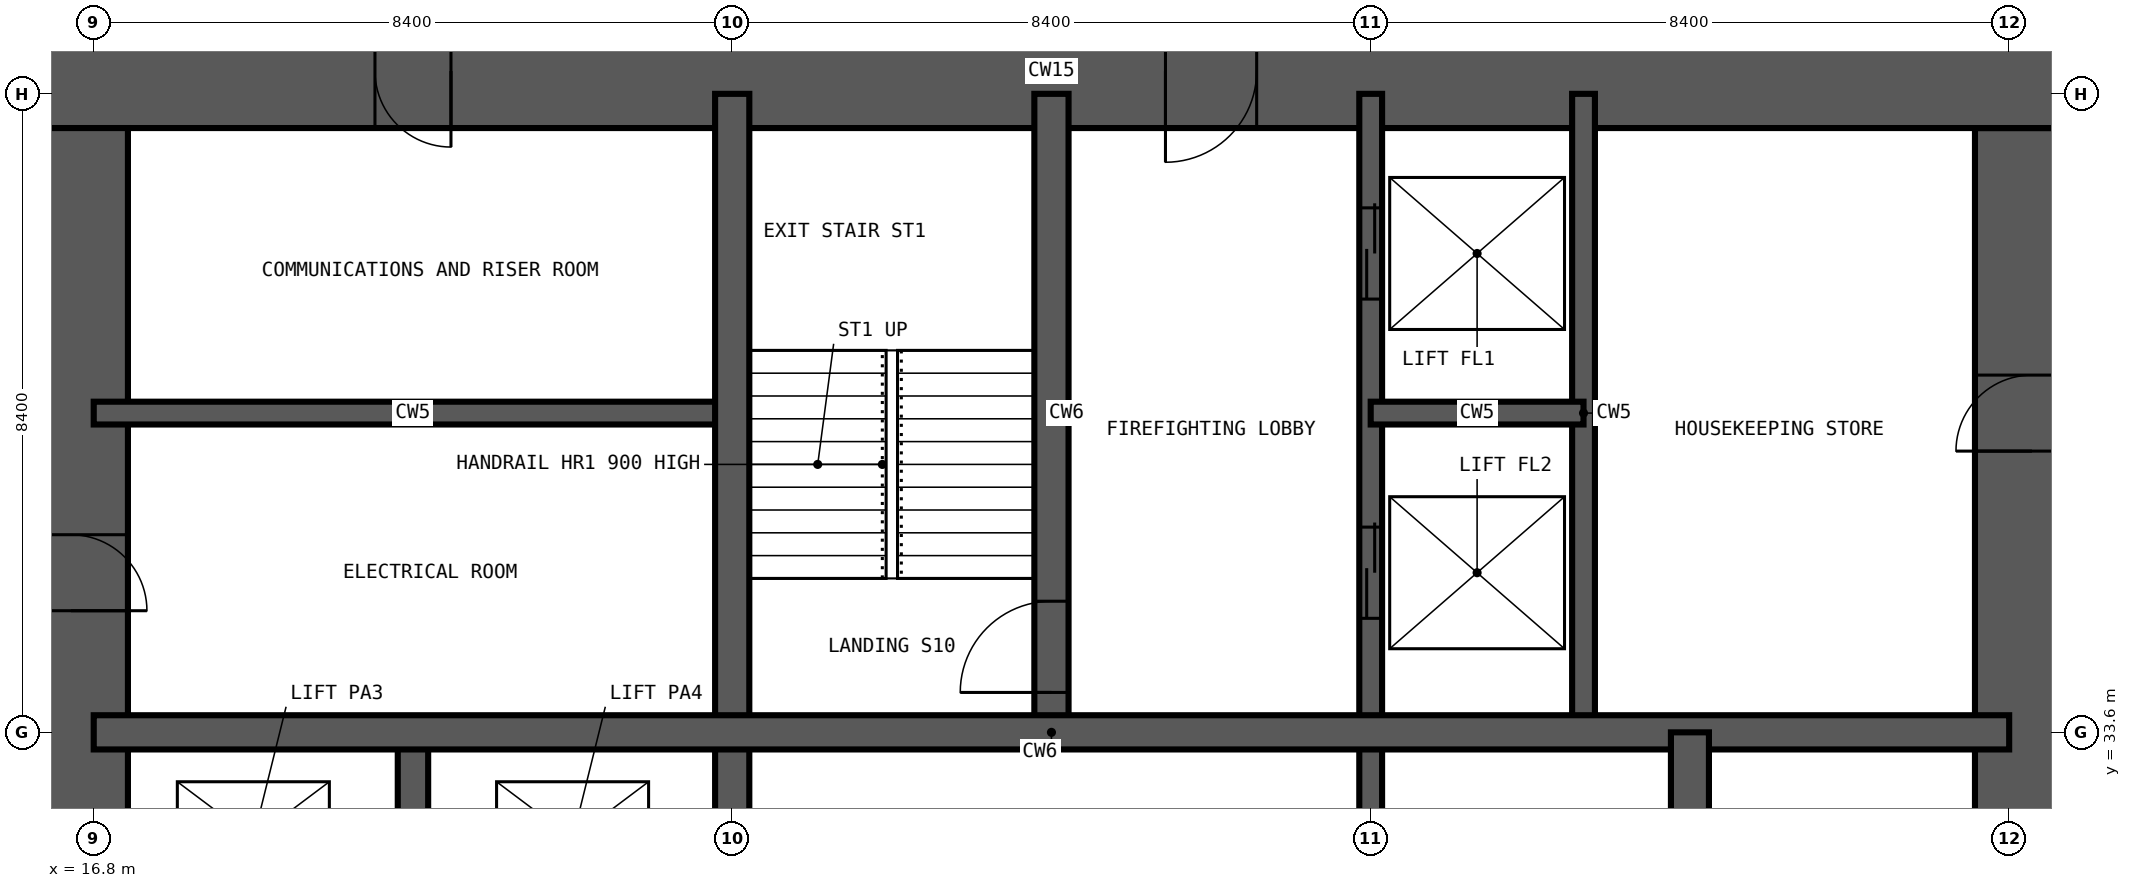
"""IFC4 building model, lengths in metres.
Left out: names, types, materials, properties, quantities, classifications, styles, units other than length and angle.
Written with IfcOpenShell. Run it as: python <this file> out.ifc"""

import sys

from ifc_helpers import new_model, si_unit, direction, frame, frame_2d, origin, place, context, subcontext, project, spatial, rectangle, extrude, element, fill, save


model = new_model("IFC4")
c1 = context("Model", 3, precision=1e-05, world=origin(), true_north=direction((0.0, 1.0)))
c2 = subcontext(c1, "Body", "Model", "MODEL_VIEW")
j1 = project(units=[si_unit("LENGTHUNIT", "METRE"), si_unit("PLANEANGLEUNIT", "RADIAN")], contexts=[c1])
p1 = place(None, origin())
s1 = spatial("IfcSite", under=j1, at=p1, CompositionType="ELEMENT")
p2 = place(p1, origin())
s2 = spatial("IfcBuilding", under=s1, at=p2, CompositionType="ELEMENT")
p3 = place(p2, frame((0.0, 0.0, 52.2)))
s3 = spatial("IfcBuildingStorey", under=s2, at=p3, CompositionType="ELEMENT", Elevation=52.2)
p4 = place(p3, frame((42.3, 17.25, -0.35), z_axis=(0.0, 0.0, 1.0), x_axis=(0.0, 1.0, 0.0)))
e1 = element("IfcWall", 1, at=p4, inside=s3, PredefinedType="SHEAR", context=c2, shape_type="SweptSolid", body=[
    extrude(rectangle(XDim=24.3, YDim=1.5, at=frame_2d((12.15, 0.0))), origin(), (0.0, 0.0, 1.0), 3.6),
])
p5 = place(p4, frame((0.35, 0.0, 0.35)))
e2 = element("IfcOpeningElement", 2, at=p5, cuts=e1, PredefinedType="OPENING", context=c2, shape_type="SweptSolid", body=[
    extrude(rectangle(XDim=1.2, YDim=2.2, at=frame_2d((0.6, 1.1))), frame((0.0, 0.76, 0.0), z_axis=(0.0, -1.0, 0.0), x_axis=(1.0, 0.0, 0.0)), (0.0, 0.0, 1.0), 1.52),
])
p6 = place(p4, frame((11.65, 0.0, 0.35)))
e3 = element("IfcOpeningElement", 3, at=p6, cuts=e1, PredefinedType="OPENING", context=c2, shape_type="SweptSolid", body=[
    extrude(rectangle(XDim=1.0, YDim=2.1, at=frame_2d((0.5, 1.05))), frame((0.0, 0.76, 0.0), z_axis=(0.0, -1.0, 0.0), x_axis=(1.0, 0.0, 0.0)), (0.0, 0.0, 1.0), 1.52),
])
p7 = place(p4, frame((20.05, 0.0, 0.35)))
e4 = element("IfcOpeningElement", 4, at=p7, cuts=e1, PredefinedType="OPENING", context=c2, shape_type="SweptSolid", body=[
    extrude(rectangle(XDim=1.0, YDim=2.1, at=frame_2d((0.5, 1.05))), frame((0.0, 0.76, 0.0), z_axis=(0.0, -1.0, 0.0), x_axis=(1.0, 0.0, 0.0)), (0.0, 0.0, 1.0), 1.52),
])
p8 = place(p3, frame((43.05, 42.3, -0.35), z_axis=(0.0, 0.0, 1.0), x_axis=(-1.0, 0.0, 0.0)))
e5 = element("IfcWall", 5, at=p8, inside=s3, PredefinedType="SHEAR", context=c2, shape_type="SweptSolid", body=[
    extrude(rectangle(XDim=27.3, YDim=1.5, at=frame_2d((13.65, 0.0))), origin(), (0.0, 0.0, 1.0), 3.6),
])
p9 = place(p8, frame((21.55, 0.0, 0.35)))
e6 = element("IfcOpeningElement", 6, at=p9, cuts=e5, PredefinedType="OPENING", context=c2, shape_type="SweptSolid", body=[
    extrude(rectangle(XDim=1.0, YDim=2.1, at=frame_2d((0.5, 1.05))), frame((0.0, 0.76, 0.0), z_axis=(0.0, -1.0, 0.0), x_axis=(1.0, 0.0, 0.0)), (0.0, 0.0, 1.0), 1.52),
])
p10 = place(p8, frame((10.95, 0.0, 0.35)))
e7 = element("IfcOpeningElement", 7, at=p10, cuts=e5, PredefinedType="OPENING", context=c2, shape_type="SweptSolid", body=[
    extrude(rectangle(XDim=1.2, YDim=2.2, at=frame_2d((0.6, 1.1))), frame((0.0, 0.76, 0.0), z_axis=(0.0, -1.0, 0.0), x_axis=(1.0, 0.0, 0.0)), (0.0, 0.0, 1.0), 1.52),
])
p11 = place(p3, frame((16.5, 41.55, -0.35), z_axis=(0.0, 0.0, 1.0), x_axis=(0.0, -1.0, 0.0)))
e8 = element("IfcWall", 8, at=p11, inside=s3, PredefinedType="SHEAR", context=c2, shape_type="SweptSolid", body=[
    extrude(rectangle(XDim=24.3, YDim=1.5, at=frame_2d((12.15, 0.0))), origin(), (0.0, 0.0, 1.0), 3.6),
])
p12 = place(p11, frame((11.25, 0.0, 0.35)))
e9 = element("IfcOpeningElement", 9, at=p12, cuts=e8, PredefinedType="OPENING", context=c2, shape_type="SweptSolid", body=[
    extrude(rectangle(XDim=1.8, YDim=2.2, at=frame_2d((0.9, 1.1))), frame((0.0, 0.76, 0.0), z_axis=(0.0, -1.0, 0.0), x_axis=(1.0, 0.0, 0.0)), (0.0, 0.0, 1.0), 1.52),
])
p13 = place(p11, frame((20.05, 0.0, 0.35)))
e10 = element("IfcOpeningElement", 10, at=p13, cuts=e8, PredefinedType="OPENING", context=c2, shape_type="SweptSolid", body=[
    extrude(rectangle(XDim=1.0, YDim=2.1, at=frame_2d((0.5, 1.05))), frame((0.0, 0.76, 0.0), z_axis=(0.0, -1.0, 0.0), x_axis=(1.0, 0.0, 0.0)), (0.0, 0.0, 1.0), 1.52),
])
p14 = place(p11, frame((5.35, 0.0, 0.35)))
e11 = element("IfcOpeningElement", 11, at=p14, cuts=e8, PredefinedType="OPENING", context=c2, shape_type="SweptSolid", body=[
    extrude(rectangle(XDim=1.0, YDim=2.1, at=frame_2d((0.5, 1.05))), frame((0.0, 0.76, 0.0), z_axis=(0.0, -1.0, 0.0), x_axis=(1.0, 0.0, 0.0)), (0.0, 0.0, 1.0), 1.52),
])
p15 = place(p3, frame((33.6, 16.8, -0.35), z_axis=(0.0, 0.0, 1.0), x_axis=(0.0, 1.0, 0.0)))
e12 = element("IfcWall", 12, at=p15, inside=s3, PredefinedType="SHEAR", context=c2, shape_type="SweptSolid", body=[
    extrude(rectangle(XDim=25.2, YDim=0.3, at=frame_2d((12.6, 0.0))), origin(), (0.0, 0.0, 1.0), 3.6),
])
p16 = place(p15, frame((22.5, 0.0, 0.35)))
e13 = element("IfcOpeningElement", 13, at=p16, cuts=e12, PredefinedType="OPENING", context=c2, shape_type="SweptSolid", body=[
    extrude(rectangle(XDim=1.2, YDim=2.2, at=frame_2d((0.6, 1.1))), frame((0.0, 0.16, 0.0), z_axis=(0.0, -1.0, 0.0), x_axis=(1.0, 0.0, 0.0)), (0.0, 0.0, 1.0), 0.32),
])
p17 = place(p15, frame((18.3, 0.0, 0.35)))
e14 = element("IfcOpeningElement", 14, at=p17, cuts=e12, PredefinedType="OPENING", context=c2, shape_type="SweptSolid", body=[
    extrude(rectangle(XDim=1.2, YDim=2.2, at=frame_2d((0.6, 1.1))), frame((0.0, 0.16, 0.0), z_axis=(0.0, -1.0, 0.0), x_axis=(1.0, 0.0, 0.0)), (0.0, 0.0, 1.0), 0.32),
])
p18 = place(p15, frame((12.1, 0.0, 0.35)))
e15 = element("IfcOpeningElement", 15, at=p18, cuts=e12, PredefinedType="OPENING", context=c2, shape_type="SweptSolid", body=[
    extrude(rectangle(XDim=1.0, YDim=2.1, at=frame_2d((0.5, 1.05))), frame((0.0, 0.16, 0.0), z_axis=(0.0, -1.0, 0.0), x_axis=(1.0, 0.0, 0.0)), (0.0, 0.0, 1.0), 0.32),
])
for number, where, z_axis, x_axis in (
    (16, (36.4, 33.6, -0.35), (0.0, 0.0, 1.0), (0.0, 1.0, 0.0)),
    (17, (16.8, 37.8, -0.35), (0.0, 0.0, 1.0), (1.0, 0.0, 0.0)),
):
    element("IfcWall", number, at=place(p3, frame(where, z_axis=z_axis, x_axis=x_axis)), inside=s3, PredefinedType="SHEAR", context=c2, shape_type="SweptSolid", body=[
        extrude(rectangle(XDim=8.4, YDim=0.3, at=frame_2d((4.2, 0.0))), origin(), (0.0, 0.0, 1.0), 3.6),
    ])
p19 = place(p3, frame((33.6, 37.8, -0.35), z_axis=(0.0, 0.0, 1.0), x_axis=(1.0, 0.0, 0.0)))
e18 = element("IfcWall", 18, at=p19, inside=s3, PredefinedType="SHEAR", context=c2, shape_type="SweptSolid", body=[
    extrude(rectangle(XDim=2.8, YDim=0.3, at=frame_2d((1.4, 0.0))), origin(), (0.0, 0.0, 1.0), 3.6),
])
p20 = place(p3, frame((21.0, 30.8, -0.35), z_axis=(0.0, 0.0, 1.0), x_axis=(0.0, 1.0, 0.0)))
e19 = element("IfcWall", 19, at=p20, inside=s3, PredefinedType="SHEAR", context=c2, shape_type="SweptSolid", body=[
    extrude(rectangle(XDim=2.8, YDim=0.4, at=frame_2d((1.4, 0.0))), origin(), (0.0, 0.0, 1.0), 3.6),
])
p21 = place(p3, frame((25.2, 16.8, -0.35), z_axis=(0.0, 0.0, 1.0), x_axis=(0.0, 1.0, 0.0)))
e20 = element("IfcWall", 20, at=p21, inside=s3, PredefinedType="SHEAR", context=c2, shape_type="SweptSolid", body=[
    extrude(rectangle(XDim=25.2, YDim=0.45, at=frame_2d((12.6, 0.0))), origin(), (0.0, 0.0, 1.0), 3.6),
])
p22 = place(p3, frame((29.4, 33.6, -0.35), z_axis=(0.0, 0.0, 1.0), x_axis=(0.0, 1.0, 0.0)))
e21 = element("IfcWall", 21, at=p22, inside=s3, PredefinedType="SHEAR", context=c2, shape_type="SweptSolid", body=[
    extrude(rectangle(XDim=8.4, YDim=0.45, at=frame_2d((4.2, 0.0))), origin(), (0.0, 0.0, 1.0), 3.6),
])
p23 = place(p22, frame((0.525, 0.0, 0.35)))
e22 = element("IfcOpeningElement", 22, at=p23, cuts=e21, PredefinedType="OPENING", context=c2, shape_type="SweptSolid", body=[
    extrude(rectangle(XDim=1.2, YDim=2.2, at=frame_2d((0.6, 1.1))), frame((0.0, 0.235, 0.0), z_axis=(0.0, -1.0, 0.0), x_axis=(1.0, 0.0, 0.0)), (0.0, 0.0, 1.0), 0.47),
])
p24 = place(p3, frame((16.8, 33.6, -0.35), z_axis=(0.0, 0.0, 1.0), x_axis=(1.0, 0.0, 0.0)))
e23 = element("IfcWall", 23, at=p24, inside=s3, PredefinedType="SHEAR", context=c2, shape_type="SweptSolid", body=[
    extrude(rectangle(XDim=25.2, YDim=0.45, at=frame_2d((12.6, 0.0))), origin(), (0.0, 0.0, 1.0), 3.6),
])
p25 = place(p3, frame((37.8, 30.8, -0.35), z_axis=(0.0, 0.0, 1.0), x_axis=(0.0, 1.0, 0.0)))
e24 = element("IfcWall", 24, at=p25, inside=s3, PredefinedType="SHEAR", context=c2, shape_type="SweptSolid", body=[
    extrude(rectangle(XDim=2.8, YDim=0.5, at=frame_2d((1.4, 0.0))), origin(), (0.0, 0.0, 1.0), 3.6),
])
p26 = place(p23, origin())
e25 = element("IfcDoor", 25, at=p26, inside=s3, OperationType="SINGLE_SWING_LEFT", PredefinedType="DOOR", context=c2, shape_type="SweptSolid", body=[
    extrude(rectangle(XDim=1.2, YDim=2.2, at=frame_2d((0.6, 1.1))), frame((0.0, 0.025, 0.0), z_axis=(0.0, -1.0, 0.0), x_axis=(1.0, 0.0, 0.0)), (0.0, 0.0, 1.0), 0.05),
])
fill(e22, e25)
p27 = place(p16, origin())
e26 = element("IfcDoor", 26, at=p27, inside=s3, OperationType="DOUBLE_DOOR_SLIDING", PredefinedType="DOOR", context=c2, shape_type="SweptSolid", body=[
    extrude(rectangle(XDim=1.2, YDim=2.2, at=frame_2d((0.6, 1.1))), frame((0.0, 0.025, 0.0), z_axis=(0.0, -1.0, 0.0), x_axis=(1.0, 0.0, 0.0)), (0.0, 0.0, 1.0), 0.05),
])
fill(e13, e26)
p28 = place(p17, origin())
e27 = element("IfcDoor", 27, at=p28, inside=s3, OperationType="DOUBLE_DOOR_SLIDING", PredefinedType="DOOR", context=c2, shape_type="SweptSolid", body=[
    extrude(rectangle(XDim=1.2, YDim=2.2, at=frame_2d((0.6, 1.1))), frame((0.0, 0.025, 0.0), z_axis=(0.0, -1.0, 0.0), x_axis=(1.0, 0.0, 0.0)), (0.0, 0.0, 1.0), 0.05),
])
fill(e14, e27)
p29 = place(p14, origin())
e28 = element("IfcDoor", 28, at=p29, inside=s3, OperationType="SINGLE_SWING_RIGHT", PredefinedType="DOOR", context=c2, shape_type="SweptSolid", body=[
    extrude(rectangle(XDim=1.0, YDim=2.1, at=frame_2d((0.5, 1.05))), frame((0.0, 0.025, 0.0), z_axis=(0.0, -1.0, 0.0), x_axis=(1.0, 0.0, 0.0)), (0.0, 0.0, 1.0), 0.05),
])
fill(e11, e28)
p30 = place(p9, origin())
e29 = element("IfcDoor", 29, at=p30, inside=s3, OperationType="SINGLE_SWING_LEFT", PredefinedType="DOOR", context=c2, shape_type="SweptSolid", body=[
    extrude(rectangle(XDim=1.0, YDim=2.1, at=frame_2d((0.5, 1.05))), frame((0.0, 0.025, 0.0), z_axis=(0.0, -1.0, 0.0), x_axis=(1.0, 0.0, 0.0)), (0.0, 0.0, 1.0), 0.05),
])
fill(e6, e29)
p31 = place(p10, origin())
e30 = element("IfcDoor", 30, at=p31, inside=s3, OperationType="SINGLE_SWING_RIGHT", PredefinedType="DOOR", context=c2, shape_type="SweptSolid", body=[
    extrude(rectangle(XDim=1.2, YDim=2.2, at=frame_2d((0.6, 1.1))), frame((0.0, 0.025, 0.0), z_axis=(0.0, -1.0, 0.0), x_axis=(1.0, 0.0, 0.0)), (0.0, 0.0, 1.0), 0.05),
])
fill(e7, e30)
p32 = place(p7, origin())
e31 = element("IfcDoor", 31, at=p32, inside=s3, OperationType="SINGLE_SWING_LEFT", PredefinedType="DOOR", context=c2, shape_type="SweptSolid", body=[
    extrude(rectangle(XDim=1.0, YDim=2.1, at=frame_2d((0.5, 1.05))), frame((0.0, 0.025, 0.0), z_axis=(0.0, -1.0, 0.0), x_axis=(1.0, 0.0, 0.0)), (0.0, 0.0, 1.0), 0.05),
])
fill(e4, e31)
save(model, sys.argv[1])
